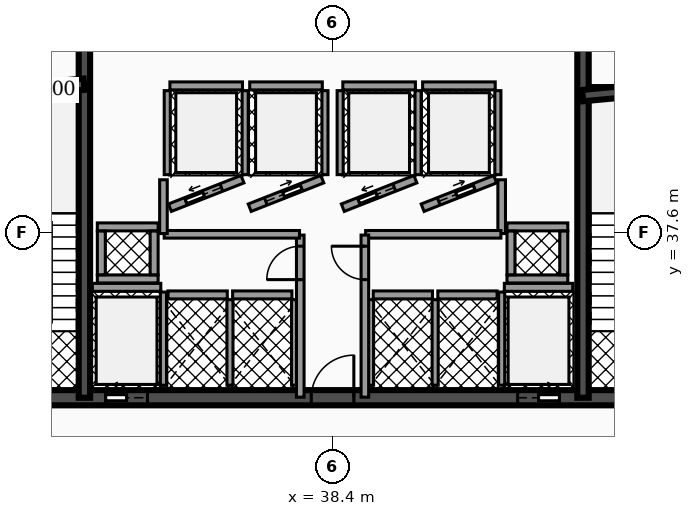
"""IFC4 building model, lengths in metres.
Left out: names, types, materials, properties, quantities, classifications, styles, units other than length and angle.
Written with IfcOpenShell. Run it as: python <this file> out.ifc"""

import sys

from ifc_helpers import new_model, si_unit, direction, frame, frame_2d, origin, place, context, subcontext, project, spatial, rectangle, extrude, element, fill, save


model = new_model("IFC4")
c1 = context("Model", 3, precision=1e-05, world=origin(), true_north=direction((0.0, 1.0)))
c2 = subcontext(c1, "Body", "Model", "MODEL_VIEW")
j1 = project(units=[si_unit("LENGTHUNIT", "METRE"), si_unit("PLANEANGLEUNIT", "RADIAN")], contexts=[c1])
p1 = place(None, origin())
s1 = spatial("IfcSite", under=j1, at=p1, CompositionType="ELEMENT")
p2 = place(p1, origin())
s2 = spatial("IfcBuilding", under=s1, at=p2, CompositionType="ELEMENT")
p3 = place(p2, frame((0.0, 0.0, 52.02)))
s3 = spatial("IfcBuildingStorey", under=s2, at=p3, CompositionType="ELEMENT", Elevation=52.02)
p4 = place(p3, frame((28.4, 33.25, 0.0), z_axis=(0.0, 0.0, 1.0), x_axis=(1.0, 0.0, 0.0)))
e1 = element("IfcWall", 1, at=p4, inside=s3, PredefinedType="SHEAR", context=c2, shape_type="SweptSolid", body=[
    extrude(rectangle(XDim=20.06, YDim=0.4, at=frame_2d((10.03, 0.0))), origin(), (0.0, 0.0, 1.0), 3.82),
])
p5 = place(p4, frame((4.03, 0.0, 0.0)))
e2 = element("IfcOpeningElement", 2, at=p5, cuts=e1, PredefinedType="OPENING", context=c2, shape_type="SweptSolid", body=[
    extrude(rectangle(XDim=1.1, YDim=2.15, at=frame_2d((0.55, 1.075))), frame((0.0, 0.21, 0.0), z_axis=(0.0, -1.0, 0.0), x_axis=(1.0, 0.0, 0.0)), (0.0, 0.0, 1.0), 0.42),
])
p6 = place(p4, frame((14.87, 0.0, 0.0)))
e3 = element("IfcOpeningElement", 3, at=p6, cuts=e1, PredefinedType="OPENING", context=c2, shape_type="SweptSolid", body=[
    extrude(rectangle(XDim=1.1, YDim=2.15, at=frame_2d((0.55, 1.075))), frame((0.0, 0.21, 0.0), z_axis=(0.0, -1.0, 0.0), x_axis=(1.0, 0.0, 0.0)), (0.0, 0.0, 1.0), 0.42),
])
p7 = place(p4, frame((1.31, 0.0, 0.0)))
e4 = element("IfcOpeningElement", 4, at=p7, cuts=e1, PredefinedType="OPENING", context=c2, shape_type="SweptSolid", body=[
    extrude(rectangle(XDim=1.1, YDim=2.2, at=frame_2d((0.55, 1.1))), frame((0.0, 0.21, 0.0), z_axis=(0.0, -1.0, 0.0), x_axis=(1.0, 0.0, 0.0)), (0.0, 0.0, 1.0), 0.42),
])
p8 = place(p4, frame((9.44, 0.0, 0.0)))
e5 = element("IfcOpeningElement", 5, at=p8, cuts=e1, PredefinedType="OPENING", context=c2, shape_type="SweptSolid", body=[
    extrude(rectangle(XDim=1.12, YDim=2.05, at=frame_2d((0.56, 1.025))), frame((0.0, 0.21, 0.0), z_axis=(0.0, -1.0, 0.0), x_axis=(1.0, 0.0, 0.0)), (0.0, 0.0, 1.0), 0.42),
])
p9 = place(p4, frame((17.65, 0.0, 0.0)))
e6 = element("IfcOpeningElement", 6, at=p9, cuts=e1, PredefinedType="OPENING", context=c2, shape_type="SweptSolid", body=[
    extrude(rectangle(XDim=1.1, YDim=2.2, at=frame_2d((0.55, 1.1))), frame((0.0, 0.21, 0.0), z_axis=(0.0, -1.0, 0.0), x_axis=(1.0, 0.0, 0.0)), (0.0, 0.0, 1.0), 0.42),
])
for number, where, z_axis, x_axis in (
    (7, (31.87, 33.25, 0.0), (0.0, 0.0, 1.0), (0.0, 1.0, 0.0)),
    (8, (44.99, 33.25, 0.0), (0.0, 0.0, 1.0), (0.0, 1.0, 0.0)),
):
    element("IfcWall", number, at=place(p3, frame(where, z_axis=z_axis, x_axis=x_axis)), inside=s3, PredefinedType="SHEAR", context=c2, shape_type="SweptSolid", body=[
        extrude(rectangle(XDim=10.2, YDim=0.3, at=frame_2d((5.1, 0.0))), origin(), (0.0, 0.0, 1.0), 3.82),
    ])
p10 = place(p3, frame((28.64, 41.2, 0.0), z_axis=(0.0, 0.0, 1.0), x_axis=(0.995687118776, 0.092774789157, 0.0)))
e9 = element("IfcWall", 9, at=p10, inside=s3, PredefinedType="SHEAR", context=c2, shape_type="SweptSolid", body=[
    extrude(rectangle(XDim=3.234, YDim=0.3, at=frame_2d((1.617, 0.0))), origin(), (0.0, 0.0, 1.0), 3.82),
])
p11 = place(p3, frame((44.98, 41.2, 0.0), z_axis=(0.0, 0.0, 1.0), x_axis=(0.995686468965, 0.09278176286, 0.0)))
e10 = element("IfcWall", 10, at=p11, inside=s3, PredefinedType="SHEAR", context=c2, shape_type="SweptSolid", body=[
    extrude(rectangle(XDim=3.234, YDim=0.3, at=frame_2d((1.617, 0.0))), origin(), (0.0, 0.0, 1.0), 3.82),
])
p12 = place(p3, frame((32.08, 36.155, 0.0), z_axis=(0.0, 0.0, 1.0), x_axis=(1.0, 0.0, 0.0)))
e11 = element("IfcWall", 11, at=p12, inside=s3, PredefinedType="SOLIDWALL", context=c2, shape_type="SweptSolid", body=[
    extrude(rectangle(XDim=1.8, YDim=0.21, at=frame_2d((0.9, 0.0))), origin(), (0.0, 0.0, 1.0), 2.792),
])
p13 = place(p3, frame((33.95, 33.58, 0.0), z_axis=(0.0, 0.0, 1.0), x_axis=(0.0, 1.0, 0.0)))
e12 = element("IfcWall", 12, at=p13, inside=s3, PredefinedType="SOLIDWALL", context=c2, shape_type="SweptSolid", body=[
    extrude(rectangle(XDim=2.45, YDim=0.16, at=frame_2d((1.225, 0.0))), origin(), (0.0, 0.0, 1.0), 2.792),
])
p14 = place(p3, frame((42.92, 36.155, 0.0), z_axis=(0.0, 0.0, 1.0), x_axis=(1.0, 0.0, 0.0)))
e13 = element("IfcWall", 13, at=p14, inside=s3, PredefinedType="SOLIDWALL", context=c2, shape_type="SweptSolid", body=[
    extrude(rectangle(XDim=1.8, YDim=0.21, at=frame_2d((0.9, 0.0))), origin(), (0.0, 0.0, 1.0), 2.792),
])
p15 = place(p3, frame((42.85, 33.58, 0.0), z_axis=(0.0, 0.0, 1.0), x_axis=(0.0, 1.0, 0.0)))
e14 = element("IfcWall", 14, at=p15, inside=s3, PredefinedType="SOLIDWALL", context=c2, shape_type="SweptSolid", body=[
    extrude(rectangle(XDim=2.45, YDim=0.16, at=frame_2d((1.225, 0.0))), origin(), (0.0, 0.0, 1.0), 2.792),
])
p16 = place(p3, frame((34.12, 38.25, 0.0), z_axis=(0.0, 0.0, 1.0), x_axis=(0.930804993012, 0.36551616241, 0.0)))
e15 = element("IfcWall", 15, at=p16, inside=s3, PredefinedType="SOLIDWALL", context=c2, shape_type="SweptSolid", body=[
    extrude(rectangle(XDim=2.052, YDim=0.21, at=frame_2d((1.026, 0.0))), origin(), (0.0, 0.0, 1.0), 2.792),
])
p17 = place(p16, frame((0.455, 0.0, 0.0)))
e16 = element("IfcOpeningElement", 16, at=p17, cuts=e15, PredefinedType="OPENING", context=c2, shape_type="SweptSolid", body=[
    extrude(rectangle(XDim=1.0, YDim=2.1, at=frame_2d((0.5, 1.05))), frame((0.0, 0.115, 0.0), z_axis=(0.0, -1.0, 0.0), x_axis=(1.0, 0.0, 0.0)), (0.0, 0.0, 1.0), 0.23),
])
p18 = place(p3, frame((34.12, 41.455, 0.0), z_axis=(0.0, 0.0, 1.0), x_axis=(1.0, 0.0, 0.0)))
e17 = element("IfcWall", 17, at=p18, inside=s3, PredefinedType="SOLIDWALL", context=c2, shape_type="SweptSolid", body=[
    extrude(rectangle(XDim=1.91, YDim=0.21, at=frame_2d((0.955, 0.0))), origin(), (0.0, 0.0, 1.0), 2.792),
])
for number, where, z_axis, x_axis in (
    (18, (34.05, 39.12, 0.0), (0.0, 0.0, 1.0), (0.0, 1.0, 0.0)),
    (19, (36.1, 39.12, 0.0), (0.0, 0.0, 1.0), (0.0, 1.0, 0.0)),
):
    element("IfcWall", number, at=place(p3, frame(where, z_axis=z_axis, x_axis=x_axis)), inside=s3, PredefinedType="SOLIDWALL", context=c2, shape_type="SweptSolid", body=[
        extrude(rectangle(XDim=2.21, YDim=0.16, at=frame_2d((1.105, 0.0))), origin(), (0.0, 0.0, 1.0), 2.792),
    ])
p19 = place(p3, frame((36.22, 38.25, 0.0), z_axis=(0.0, 0.0, 1.0), x_axis=(0.930804993012, 0.36551616241, 0.0)))
e20 = element("IfcWall", 20, at=p19, inside=s3, PredefinedType="SOLIDWALL", context=c2, shape_type="SweptSolid", body=[
    extrude(rectangle(XDim=2.052, YDim=0.21, at=frame_2d((1.026, 0.0))), origin(), (0.0, 0.0, 1.0), 2.792),
])
p20 = place(p19, frame((0.455, 0.0, 0.0)))
e21 = element("IfcOpeningElement", 21, at=p20, cuts=e20, PredefinedType="OPENING", context=c2, shape_type="SweptSolid", body=[
    extrude(rectangle(XDim=1.0, YDim=2.1, at=frame_2d((0.5, 1.05))), frame((0.0, 0.115, 0.0), z_axis=(0.0, -1.0, 0.0), x_axis=(1.0, 0.0, 0.0)), (0.0, 0.0, 1.0), 0.23),
])
p21 = place(p3, frame((36.22, 41.455, 0.0), z_axis=(0.0, 0.0, 1.0), x_axis=(1.0, 0.0, 0.0)))
e22 = element("IfcWall", 22, at=p21, inside=s3, PredefinedType="SOLIDWALL", context=c2, shape_type="SweptSolid", body=[
    extrude(rectangle(XDim=1.91, YDim=0.21, at=frame_2d((0.955, 0.0))), origin(), (0.0, 0.0, 1.0), 2.792),
])
p22 = place(p3, frame((38.2, 39.12, 0.0), z_axis=(0.0, 0.0, 1.0), x_axis=(0.0, 1.0, 0.0)))
e23 = element("IfcWall", 23, at=p22, inside=s3, PredefinedType="SOLIDWALL", context=c2, shape_type="SweptSolid", body=[
    extrude(rectangle(XDim=2.21, YDim=0.16, at=frame_2d((1.105, 0.0))), origin(), (0.0, 0.0, 1.0), 2.792),
])
p23 = place(p3, frame((38.67, 38.25, 0.0), z_axis=(0.0, 0.0, 1.0), x_axis=(0.930820886763, 0.3654756856, 0.0)))
e24 = element("IfcWall", 24, at=p23, inside=s3, PredefinedType="SOLIDWALL", context=c2, shape_type="SweptSolid", body=[
    extrude(rectangle(XDim=2.052, YDim=0.21, at=frame_2d((1.026, 0.0))), origin(), (0.0, 0.0, 1.0), 2.792),
])
p24 = place(p23, frame((0.455, 0.0, 0.0)))
e25 = element("IfcOpeningElement", 25, at=p24, cuts=e24, PredefinedType="OPENING", context=c2, shape_type="SweptSolid", body=[
    extrude(rectangle(XDim=1.0, YDim=2.1, at=frame_2d((0.5, 1.05))), frame((0.0, 0.115, 0.0), z_axis=(0.0, -1.0, 0.0), x_axis=(1.0, 0.0, 0.0)), (0.0, 0.0, 1.0), 0.23),
])
p25 = place(p3, frame((38.67, 41.455, 0.0), z_axis=(0.0, 0.0, 1.0), x_axis=(1.0, 0.0, 0.0)))
e26 = element("IfcWall", 26, at=p25, inside=s3, PredefinedType="SOLIDWALL", context=c2, shape_type="SweptSolid", body=[
    extrude(rectangle(XDim=1.91, YDim=0.21, at=frame_2d((0.955, 0.0))), origin(), (0.0, 0.0, 1.0), 2.792),
])
for number, where, z_axis, x_axis in (
    (27, (38.6, 39.12, 0.0), (0.0, 0.0, 1.0), (0.0, 1.0, 0.0)),
    (28, (40.65, 39.12, 0.0), (0.0, 0.0, 1.0), (0.0, 1.0, 0.0)),
):
    element("IfcWall", number, at=place(p3, frame(where, z_axis=z_axis, x_axis=x_axis)), inside=s3, PredefinedType="SOLIDWALL", context=c2, shape_type="SweptSolid", body=[
        extrude(rectangle(XDim=2.21, YDim=0.16, at=frame_2d((1.105, 0.0))), origin(), (0.0, 0.0, 1.0), 2.792),
    ])
p26 = place(p3, frame((40.77, 38.25, 0.0), z_axis=(0.0, 0.0, 1.0), x_axis=(0.930804993012, 0.36551616241, 0.0)))
e29 = element("IfcWall", 29, at=p26, inside=s3, PredefinedType="SOLIDWALL", context=c2, shape_type="SweptSolid", body=[
    extrude(rectangle(XDim=2.052, YDim=0.21, at=frame_2d((1.026, 0.0))), origin(), (0.0, 0.0, 1.0), 2.792),
])
p27 = place(p26, frame((0.455, 0.0, 0.0)))
e30 = element("IfcOpeningElement", 30, at=p27, cuts=e29, PredefinedType="OPENING", context=c2, shape_type="SweptSolid", body=[
    extrude(rectangle(XDim=1.0, YDim=2.1, at=frame_2d((0.5, 1.05))), frame((0.0, 0.115, 0.0), z_axis=(0.0, -1.0, 0.0), x_axis=(1.0, 0.0, 0.0)), (0.0, 0.0, 1.0), 0.23),
])
p28 = place(p3, frame((40.77, 41.455, 0.0), z_axis=(0.0, 0.0, 1.0), x_axis=(1.0, 0.0, 0.0)))
e31 = element("IfcWall", 31, at=p28, inside=s3, PredefinedType="SOLIDWALL", context=c2, shape_type="SweptSolid", body=[
    extrude(rectangle(XDim=1.91, YDim=0.21, at=frame_2d((0.955, 0.0))), origin(), (0.0, 0.0, 1.0), 2.792),
])
p29 = place(p3, frame((42.75, 39.12, 0.0), z_axis=(0.0, 0.0, 1.0), x_axis=(0.0, 1.0, 0.0)))
e32 = element("IfcWall", 32, at=p29, inside=s3, PredefinedType="SOLIDWALL", context=c2, shape_type="SweptSolid", body=[
    extrude(rectangle(XDim=2.21, YDim=0.16, at=frame_2d((1.105, 0.0))), origin(), (0.0, 0.0, 1.0), 2.792),
])
p30 = place(p3, frame((34.07, 35.955, 0.0), z_axis=(0.0, 0.0, 1.0), x_axis=(1.0, 0.0, 0.0)))
e33 = element("IfcWall", 33, at=p30, inside=s3, PredefinedType="SOLIDWALL", context=c2, shape_type="SweptSolid", body=[
    extrude(rectangle(XDim=1.56, YDim=0.21, at=frame_2d((0.78, 0.0))), origin(), (0.0, 0.0, 1.0), 2.792),
])
p31 = place(p3, frame((35.7, 33.58, 0.0), z_axis=(0.0, 0.0, 1.0), x_axis=(0.0, 1.0, 0.0)))
e34 = element("IfcWall", 34, at=p31, inside=s3, PredefinedType="SOLIDWALL", context=c2, shape_type="SweptSolid", body=[
    extrude(rectangle(XDim=2.25, YDim=0.16, at=frame_2d((1.125, 0.0))), origin(), (0.0, 0.0, 1.0), 2.792),
])
p32 = place(p3, frame((35.77, 35.955, 0.0), z_axis=(0.0, 0.0, 1.0), x_axis=(1.0, 0.0, 0.0)))
e35 = element("IfcWall", 35, at=p32, inside=s3, PredefinedType="SOLIDWALL", context=c2, shape_type="SweptSolid", body=[
    extrude(rectangle(XDim=1.56, YDim=0.21, at=frame_2d((0.78, 0.0))), origin(), (0.0, 0.0, 1.0), 2.792),
])
p33 = place(p3, frame((37.4, 33.58, 0.0), z_axis=(0.0, 0.0, 1.0), x_axis=(0.0, 1.0, 0.0)))
e36 = element("IfcWall", 36, at=p33, inside=s3, PredefinedType="SOLIDWALL", context=c2, shape_type="SweptSolid", body=[
    extrude(rectangle(XDim=2.25, YDim=0.16, at=frame_2d((1.125, 0.0))), origin(), (0.0, 0.0, 1.0), 2.792),
])
p34 = place(p3, frame((39.47, 35.955, 0.0), z_axis=(0.0, 0.0, 1.0), x_axis=(1.0, 0.0, 0.0)))
e37 = element("IfcWall", 37, at=p34, inside=s3, PredefinedType="SOLIDWALL", context=c2, shape_type="SweptSolid", body=[
    extrude(rectangle(XDim=1.56, YDim=0.21, at=frame_2d((0.78, 0.0))), origin(), (0.0, 0.0, 1.0), 2.792),
])
for number, where, z_axis, x_axis in (
    (38, (39.4, 33.58, 0.0), (0.0, 0.0, 1.0), (0.0, 1.0, 0.0)),
    (39, (41.1, 33.58, 0.0), (0.0, 0.0, 1.0), (0.0, 1.0, 0.0)),
):
    element("IfcWall", number, at=place(p3, frame(where, z_axis=z_axis, x_axis=x_axis)), inside=s3, PredefinedType="SOLIDWALL", context=c2, shape_type="SweptSolid", body=[
        extrude(rectangle(XDim=2.25, YDim=0.16, at=frame_2d((1.125, 0.0))), origin(), (0.0, 0.0, 1.0), 2.792),
    ])
p35 = place(p3, frame((41.17, 35.955, 0.0), z_axis=(0.0, 0.0, 1.0), x_axis=(1.0, 0.0, 0.0)))
e40 = element("IfcWall", 40, at=p35, inside=s3, PredefinedType="SOLIDWALL", context=c2, shape_type="SweptSolid", body=[
    extrude(rectangle(XDim=1.56, YDim=0.21, at=frame_2d((0.78, 0.0))), origin(), (0.0, 0.0, 1.0), 2.792),
])
for number, where, z_axis, x_axis in (
    (41, (32.21, 36.375, 0.0), (0.0, 0.0, 1.0), (1.0, 0.0, 0.0)),
    (42, (32.21, 37.745, 0.0), (0.0, 0.0, 1.0), (1.0, 0.0, 0.0)),
):
    element("IfcWall", number, at=place(p3, frame(where, z_axis=z_axis, x_axis=x_axis)), inside=s3, PredefinedType="SOLIDWALL", context=c2, shape_type="SweptSolid", body=[
        extrude(rectangle(XDim=1.6, YDim=0.21, at=frame_2d((0.8, 0.0))), origin(), (0.0, 0.0, 1.0), 3.82),
    ])
for number, where, z_axis, x_axis in (
    (43, (32.315, 36.485, 0.0), (0.0, 0.0, 1.0), (0.0, 1.0, 0.0)),
    (44, (33.705, 36.485, 0.0), (0.0, 0.0, 1.0), (0.0, 1.0, 0.0)),
):
    element("IfcWall", number, at=place(p3, frame(where, z_axis=z_axis, x_axis=x_axis)), inside=s3, PredefinedType="SOLIDWALL", context=c2, shape_type="SweptSolid", body=[
        extrude(rectangle(XDim=1.15, YDim=0.21, at=frame_2d((0.575, 0.0))), origin(), (0.0, 0.0, 1.0), 3.82),
    ])
for number, where, z_axis, x_axis in (
    (45, (42.99, 36.375, 0.0), (0.0, 0.0, 1.0), (1.0, 0.0, 0.0)),
    (46, (42.99, 37.745, 0.0), (0.0, 0.0, 1.0), (1.0, 0.0, 0.0)),
):
    element("IfcWall", number, at=place(p3, frame(where, z_axis=z_axis, x_axis=x_axis)), inside=s3, PredefinedType="SOLIDWALL", context=c2, shape_type="SweptSolid", body=[
        extrude(rectangle(XDim=1.6, YDim=0.21, at=frame_2d((0.8, 0.0))), origin(), (0.0, 0.0, 1.0), 3.82),
    ])
for number, where, z_axis, x_axis in (
    (47, (43.095, 36.485, 0.0), (0.0, 0.0, 1.0), (0.0, 1.0, 0.0)),
    (48, (44.485, 36.485, 0.0), (0.0, 0.0, 1.0), (0.0, 1.0, 0.0)),
):
    element("IfcWall", number, at=place(p3, frame(where, z_axis=z_axis, x_axis=x_axis)), inside=s3, PredefinedType="SOLIDWALL", context=c2, shape_type="SweptSolid", body=[
        extrude(rectangle(XDim=1.15, YDim=0.21, at=frame_2d((0.575, 0.0))), origin(), (0.0, 0.0, 1.0), 3.82),
    ])
p36 = place(p3, frame((37.55, 33.265, 0.0), z_axis=(0.0, 0.0, 1.0), x_axis=(0.0, 1.0, 0.0)))
e49 = element("IfcWall", 49, at=p36, inside=s3, PredefinedType="PARTITIONING", context=c2, shape_type="SweptSolid", body=[
    extrude(rectangle(XDim=4.265, YDim=0.2, at=frame_2d((2.133, 0.0))), origin(), (0.0, 0.0, 1.0), 2.777),
])
p37 = place(p36, frame((3.093, 0.0, 0.0)))
e50 = element("IfcOpeningElement", 50, at=p37, cuts=e49, PredefinedType="OPENING", context=c2, shape_type="SweptSolid", body=[
    extrude(rectangle(XDim=0.88, YDim=2.05, at=frame_2d((0.44, 1.025))), frame((0.0, 0.11, 0.0), z_axis=(0.0, -1.0, 0.0), x_axis=(1.0, 0.0, 0.0)), (0.0, 0.0, 1.0), 0.22),
])
p38 = place(p3, frame((33.97, 37.55, 0.0), z_axis=(0.0, 0.0, 1.0), x_axis=(1.0, 0.0, 0.0)))
e51 = element("IfcWall", 51, at=p38, inside=s3, PredefinedType="PARTITIONING", context=c2, shape_type="SweptSolid", body=[
    extrude(rectangle(XDim=3.56, YDim=0.2, at=frame_2d((1.78, 0.0))), origin(), (0.0, 0.0, 1.0), 2.777),
])
for number, where, z_axis, x_axis in (
    (52, (33.95, 37.57, 0.0), (0.0, 0.0, 1.0), (0.0, 1.0, 0.0)),
    (53, (42.85, 37.57, 0.0), (0.0, 0.0, 1.0), (0.0, 1.0, 0.0)),
):
    element("IfcWall", number, at=place(p3, frame(where, z_axis=z_axis, x_axis=x_axis)), inside=s3, PredefinedType="PARTITIONING", context=c2, shape_type="SweptSolid", body=[
        extrude(rectangle(XDim=1.415, YDim=0.2, at=frame_2d((0.708, 0.0))), origin(), (0.0, 0.0, 1.0), 2.777),
    ])
p39 = place(p3, frame((39.27, 37.55, 0.0), z_axis=(0.0, 0.0, 1.0), x_axis=(1.0, 0.0, 0.0)))
e54 = element("IfcWall", 54, at=p39, inside=s3, PredefinedType="PARTITIONING", context=c2, shape_type="SweptSolid", body=[
    extrude(rectangle(XDim=3.56, YDim=0.2, at=frame_2d((1.78, 0.0))), origin(), (0.0, 0.0, 1.0), 2.777),
])
p40 = place(p3, frame((39.25, 33.265, 0.0), z_axis=(0.0, 0.0, 1.0), x_axis=(0.0, 1.0, 0.0)))
e55 = element("IfcWall", 55, at=p40, inside=s3, PredefinedType="PARTITIONING", context=c2, shape_type="SweptSolid", body=[
    extrude(rectangle(XDim=4.265, YDim=0.2, at=frame_2d((2.133, 0.0))), origin(), (0.0, 0.0, 1.0), 2.777),
])
p41 = place(p40, frame((3.093, 0.0, 0.0)))
e56 = element("IfcOpeningElement", 56, at=p41, cuts=e55, PredefinedType="OPENING", context=c2, shape_type="SweptSolid", body=[
    extrude(rectangle(XDim=0.88, YDim=2.05, at=frame_2d((0.44, 1.025))), frame((0.0, 0.11, 0.0), z_axis=(0.0, -1.0, 0.0), x_axis=(1.0, 0.0, 0.0)), (0.0, 0.0, 1.0), 0.22),
])
p42 = place(p5, origin())
e57 = element("IfcDoor", 57, at=p42, inside=s3, OperationType="SLIDING_TO_LEFT", PredefinedType="DOOR", context=c2, shape_type="SweptSolid", body=[
    extrude(rectangle(XDim=1.1, YDim=2.15, at=frame_2d((0.55, 1.075))), frame((0.0, 0.025, 0.0), z_axis=(0.0, -1.0, 0.0), x_axis=(1.0, 0.0, 0.0)), (0.0, 0.0, 1.0), 0.05),
])
fill(e2, e57)
p43 = place(p6, origin())
e58 = element("IfcDoor", 58, at=p43, inside=s3, OperationType="SLIDING_TO_RIGHT", PredefinedType="DOOR", context=c2, shape_type="SweptSolid", body=[
    extrude(rectangle(XDim=1.1, YDim=2.15, at=frame_2d((0.55, 1.075))), frame((0.0, 0.025, 0.0), z_axis=(0.0, -1.0, 0.0), x_axis=(1.0, 0.0, 0.0)), (0.0, 0.0, 1.0), 0.05),
])
fill(e3, e58)
p44 = place(p17, origin())
e59 = element("IfcDoor", 59, at=p44, inside=s3, OperationType="SLIDING_TO_LEFT", PredefinedType="DOOR", context=c2, shape_type="SweptSolid", body=[
    extrude(rectangle(XDim=1.0, YDim=2.1, at=frame_2d((0.5, 1.05))), frame((0.0, 0.025, 0.0), z_axis=(0.0, -1.0, 0.0), x_axis=(1.0, 0.0, 0.0)), (0.0, 0.0, 1.0), 0.05),
])
fill(e16, e59)
p45 = place(p20, origin())
e60 = element("IfcDoor", 60, at=p45, inside=s3, OperationType="SLIDING_TO_RIGHT", PredefinedType="DOOR", context=c2, shape_type="SweptSolid", body=[
    extrude(rectangle(XDim=1.0, YDim=2.1, at=frame_2d((0.5, 1.05))), frame((0.0, 0.025, 0.0), z_axis=(0.0, -1.0, 0.0), x_axis=(1.0, 0.0, 0.0)), (0.0, 0.0, 1.0), 0.05),
])
fill(e21, e60)
p46 = place(p24, origin())
e61 = element("IfcDoor", 61, at=p46, inside=s3, OperationType="SLIDING_TO_LEFT", PredefinedType="DOOR", context=c2, shape_type="SweptSolid", body=[
    extrude(rectangle(XDim=1.0, YDim=2.1, at=frame_2d((0.5, 1.05))), frame((0.0, 0.025, 0.0), z_axis=(0.0, -1.0, 0.0), x_axis=(1.0, 0.0, 0.0)), (0.0, 0.0, 1.0), 0.05),
])
fill(e25, e61)
p47 = place(p27, origin())
e62 = element("IfcDoor", 62, at=p47, inside=s3, OperationType="SLIDING_TO_RIGHT", PredefinedType="DOOR", context=c2, shape_type="SweptSolid", body=[
    extrude(rectangle(XDim=1.0, YDim=2.1, at=frame_2d((0.5, 1.05))), frame((0.0, 0.025, 0.0), z_axis=(0.0, -1.0, 0.0), x_axis=(1.0, 0.0, 0.0)), (0.0, 0.0, 1.0), 0.05),
])
fill(e30, e62)
p48 = place(p8, origin())
e63 = element("IfcDoor", 63, at=p48, inside=s3, OperationType="SINGLE_SWING_RIGHT", PredefinedType="DOOR", context=c2, shape_type="SweptSolid", body=[
    extrude(rectangle(XDim=1.12, YDim=2.05, at=frame_2d((0.56, 1.025))), frame((0.0, 0.025, 0.0), z_axis=(0.0, -1.0, 0.0), x_axis=(1.0, 0.0, 0.0)), (0.0, 0.0, 1.0), 0.05),
])
fill(e5, e63)
p49 = place(p37, origin())
e64 = element("IfcDoor", 64, at=p49, inside=s3, OperationType="SINGLE_SWING_LEFT", PredefinedType="DOOR", context=c2, shape_type="SweptSolid", body=[
    extrude(rectangle(XDim=0.88, YDim=2.05, at=frame_2d((0.44, 1.025))), frame((0.0, 0.025, 0.0), z_axis=(0.0, -1.0, 0.0), x_axis=(1.0, 0.0, 0.0)), (0.0, 0.0, 1.0), 0.05),
])
fill(e50, e64)
p50 = place(p41, origin())
e65 = element("IfcDoor", 65, at=p50, inside=s3, OperationType="SINGLE_SWING_RIGHT", PredefinedType="DOOR", context=c2, shape_type="SweptSolid", body=[
    extrude(rectangle(XDim=0.88, YDim=2.05, at=frame_2d((0.44, 1.025))), frame((0.0, 0.025, 0.0), z_axis=(0.0, -1.0, 0.0), x_axis=(1.0, 0.0, 0.0)), (0.0, 0.0, 1.0), 0.05),
])
fill(e56, e65)
save(model, sys.argv[1])
